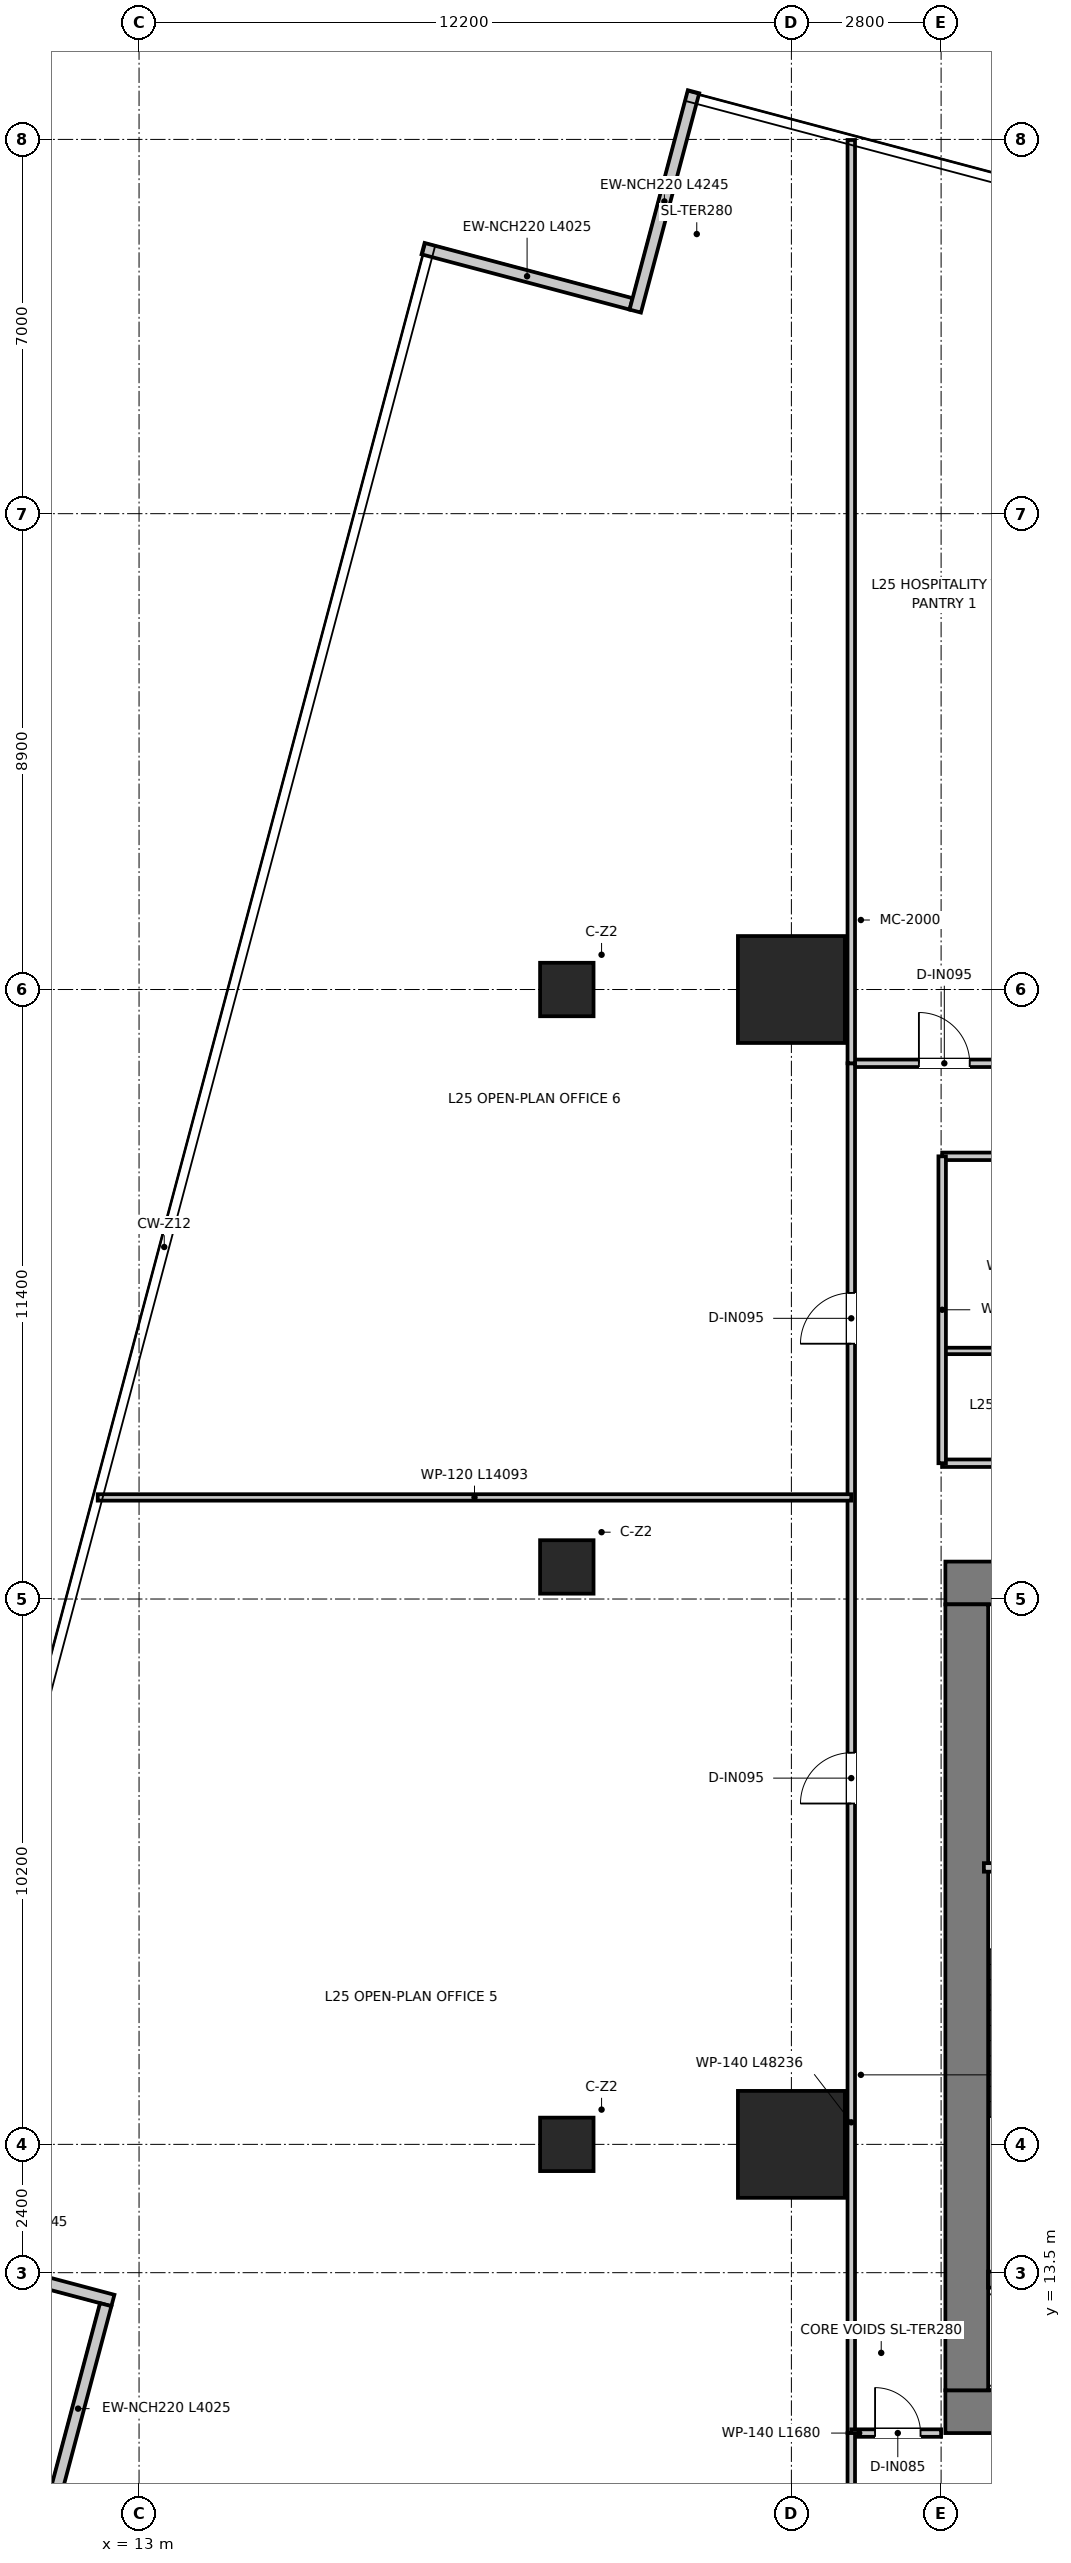
"""IFC4 building model, lengths in metres.
Left out: names, types, materials, properties, quantities, classifications, styles, units other than length and angle.
Written with IfcOpenShell. Run it as: python <this file> out.ifc"""

import sys

from ifc_helpers import new_model, si_unit, direction, frame, frame_2d, origin, origin_2d, place, context, subcontext, project, spatial, rectangle, extrude, source, transform, mapped, element, fill, save


model = new_model("IFC4")
c1 = context("Model", 3, precision=1e-05, world=origin(), true_north=direction((0.0, 1.0)))
c2 = subcontext(c1, "Body", "Model", "MODEL_VIEW")
j1 = project(units=[si_unit("LENGTHUNIT", "METRE"), si_unit("PLANEANGLEUNIT", "RADIAN")], contexts=[c1])
p1 = place(None, origin())
s1 = spatial("IfcSite", under=j1, at=p1, CompositionType="ELEMENT")
p2 = place(p1, origin())
s2 = spatial("IfcBuilding", under=s1, at=p2, CompositionType="ELEMENT")
p3 = place(p2, frame((0.0, 0.0, 105.85)))
s3 = spatial("IfcBuildingStorey", under=s2, at=p3, CompositionType="ELEMENT", Elevation=105.85)
p4 = place(p3, frame((28.08, 10.9, 0.0), z_axis=(0.0, 0.0, 1.0), x_axis=(1.0, 0.0, 0.0)))
e1 = element("IfcWall", 1, at=p4, inside=s3, PredefinedType="SHEAR", context=c2, shape_type="SweptSolid", body=[
    extrude(rectangle(XDim=15.84, YDim=0.8, at=frame_2d((7.92, 0.0))), origin(), (0.0, 0.0, 1.0), 3.95),
])
p5 = place(p3, frame((28.08, 26.4, 0.0), z_axis=(0.0, 0.0, 1.0), x_axis=(1.0, 0.0, 0.0)))
e2 = element("IfcWall", 2, at=p5, inside=s3, PredefinedType="SHEAR", context=c2, shape_type="SweptSolid", body=[
    extrude(rectangle(XDim=15.84, YDim=0.8, at=frame_2d((7.92, 0.0))), origin(), (0.0, 0.0, 1.0), 3.95),
])
p6 = place(p5, frame((7.22, 0.0, 0.0)))
e3 = element("IfcOpeningElement", 3, at=p6, cuts=e2, PredefinedType="OPENING", context=c2, shape_type="SweptSolid", body=[
    extrude(rectangle(XDim=1.4, YDim=2.2, at=frame_2d((0.7, 1.1))), frame((0.0, 0.41, 0.0), z_axis=(0.0, -1.0, 0.0), x_axis=(1.0, 0.0, 0.0)), (0.0, 0.0, 1.0), 0.82),
])
p7 = place(p5, frame((1.775, 0.0, 0.0)))
e4 = element("IfcOpeningElement", 4, at=p7, cuts=e2, PredefinedType="OPENING", context=c2, shape_type="SweptSolid", body=[
    extrude(rectangle(XDim=1.05, YDim=2.1, at=frame_2d((0.525, 1.05))), frame((0.0, 0.41, 0.0), z_axis=(0.0, -1.0, 0.0), x_axis=(1.0, 0.0, 0.0)), (0.0, 0.0, 1.0), 0.82),
])
p8 = place(p5, frame((13.015, 0.0, 0.0)))
e5 = element("IfcOpeningElement", 5, at=p8, cuts=e2, PredefinedType="OPENING", context=c2, shape_type="SweptSolid", body=[
    extrude(rectangle(XDim=1.05, YDim=2.1, at=frame_2d((0.525, 1.05))), frame((0.0, 0.41, 0.0), z_axis=(0.0, -1.0, 0.0), x_axis=(1.0, 0.0, 0.0)), (0.0, 0.0, 1.0), 0.82),
])
p9 = place(p3, frame((28.48, 11.3, 0.0), z_axis=(0.0, 0.0, 1.0), x_axis=(0.0, 1.0, 0.0)))
e6 = element("IfcWall", 6, at=p9, inside=s3, PredefinedType="SHEAR", context=c2, shape_type="SweptSolid", body=[
    extrude(rectangle(XDim=14.7, YDim=0.8, at=frame_2d((7.35, 0.0))), origin(), (0.0, 0.0, 1.0), 3.95),
])
p10 = place(p3, frame((28.88, 13.37, 0.0), z_axis=(0.0, 0.0, 1.0), x_axis=(1.0, 0.0, 0.0)))
e7 = element("IfcWall", 7, at=p10, inside=s3, PredefinedType="SHEAR", context=c2, shape_type="SweptSolid", body=[
    extrude(rectangle(XDim=3.1, YDim=0.3, at=frame_2d((1.55, 0.0))), origin(), (0.0, 0.0, 1.0), 3.95),
])
m1 = source(origin(), c2, "Body", "SweptSolid", [
    extrude(rectangle(XDim=2.0, YDim=2.0, at=origin_2d()), origin(), (0.0, 0.0, 1.0), 3.95),
])
for number, where, z_axis, x_axis in (
    (8, (25.2, 15.9, 0.0), (0.0, 0.0, 1.0), (1.0, 0.0, 0.0)),
    (9, (25.2, 37.5, 0.0), (0.0, 0.0, 1.0), (1.0, 0.0, 0.0)),
):
    element("IfcColumn", number, at=place(p3, frame(where, z_axis=z_axis, x_axis=x_axis)), inside=s3, PredefinedType="USERDEFINED", context=c2, shape_type="MappedRepresentation", body=[
        mapped(m1, transform((0.0, 0.0, 0.0), x_axis=(1.0, 0.0, 0.0), y_axis=(0.0, 1.0, 0.0), z_axis=(0.0, 0.0, 1.0), scale=1.0)),
    ])
m2 = source(origin(), c2, "Body", "SweptSolid", [
    extrude(rectangle(XDim=1.0, YDim=1.0, at=origin_2d()), origin(), (0.0, 0.0, 1.0), 3.95),
])
for number, where, z_axis, x_axis in (
    (10, (21.0, 15.9, 0.0), (0.0, 0.0, 1.0), (1.0, 0.0, 0.0)),
    (11, (21.0, 26.7, 0.0), (0.0, 0.0, 1.0), (1.0, 0.0, 0.0)),
    (12, (21.0, 37.5, 0.0), (0.0, 0.0, 1.0), (1.0, 0.0, 0.0)),
):
    element("IfcColumn", number, at=place(p3, frame(where, z_axis=z_axis, x_axis=x_axis)), inside=s3, PredefinedType="COLUMN", context=c2, shape_type="MappedRepresentation", body=[
        mapped(m2, transform((0.0, 0.0, 0.0), x_axis=(1.0, 0.0, 0.0), y_axis=(0.0, 1.0, 0.0), z_axis=(0.0, 0.0, 1.0), scale=1.0)),
    ])
p11 = place(p3, frame((22.202, 50.324, 0.0), z_axis=(0.0, 0.0, 1.0), x_axis=(-0.966492181189, 0.256696053144, 0.0)))
e13 = element("IfcWall", 13, at=p11, inside=s3, PredefinedType="ELEMENTEDWALL", context=c2, shape_type="SweptSolid", body=[
    extrude(rectangle(XDim=4.025, YDim=0.22, at=frame_2d((2.012, 0.0))), origin(), (0.0, 0.0, 1.0), 3.67),
])
p12 = place(p3, frame((8.408, 14.07, 0.0), z_axis=(0.0, 0.0, 1.0), x_axis=(0.966496943173, -0.256678123022, 0.0)))
e14 = element("IfcWall", 14, at=p12, inside=s3, PredefinedType="ELEMENTEDWALL", context=c2, shape_type="SweptSolid", body=[
    extrude(rectangle(XDim=4.245, YDim=0.22, at=frame_2d((2.123, 0.0))), origin(), (0.0, 0.0, 1.0), 3.67),
])
p13 = place(p3, frame((12.376, 12.902, 0.0), z_axis=(0.0, 0.0, 1.0), x_axis=(-0.256696053144, -0.966492181189, 0.0)))
e15 = element("IfcWall", 15, at=p13, inside=s3, PredefinedType="ELEMENTEDWALL", context=c2, shape_type="SweptSolid", body=[
    extrude(rectangle(XDim=4.025, YDim=0.22, at=frame_2d((2.012, 0.0))), origin(), (0.0, 0.0, 1.0), 3.67),
])
p14 = place(p3, frame((23.37, 54.292, 0.0), z_axis=(0.0, 0.0, 1.0), x_axis=(-0.256678123022, -0.966496943173, 0.0)))
e16 = element("IfcWall", 16, at=p14, inside=s3, PredefinedType="ELEMENTEDWALL", context=c2, shape_type="SweptSolid", body=[
    extrude(rectangle(XDim=4.245, YDim=0.22, at=frame_2d((2.123, 0.0))), origin(), (0.0, 0.0, 1.0), 3.67),
])
p15 = place(p3, frame((28.8, 21.08, 0.0), z_axis=(0.0, 0.0, 1.0), x_axis=(1.0, 0.0, 0.0)))
e17 = element("IfcWall", 17, at=p15, inside=s3, PredefinedType="PARTITIONING", context=c2, shape_type="SweptSolid", body=[
    extrude(rectangle(XDim=3.16, YDim=0.16, at=frame_2d((1.58, 0.0))), origin(), (0.0, 0.0, 1.0), 3.67),
])
p16 = place(p15, frame((1.055, 0.0, 0.0)))
e18 = element("IfcOpeningElement", 18, at=p16, cuts=e17, PredefinedType="OPENING", context=c2, shape_type="SweptSolid", body=[
    extrude(rectangle(XDim=1.05, YDim=2.1, at=frame_2d((0.525, 1.05))), frame((0.0, 0.09, 0.0), z_axis=(0.0, -1.0, 0.0), x_axis=(1.0, 0.0, 0.0)), (0.0, 0.0, 1.0), 0.18),
])
p17 = place(p3, frame((28.02, 28.64, 0.0), z_axis=(0.0, 0.0, 1.0), x_axis=(1.0, 0.0, 0.0)))
e19 = element("IfcWall", 19, at=p17, inside=s3, PredefinedType="PARTITIONING", context=c2, shape_type="SweptSolid", body=[
    extrude(rectangle(XDim=15.96, YDim=0.14, at=frame_2d((7.98, 0.0))), origin(), (0.0, 0.0, 1.0), 3.08),
])
p18 = place(p17, frame((7.455, 0.0, 0.0)))
e20 = element("IfcOpeningElement", 20, at=p18, cuts=e19, PredefinedType="OPENING", context=c2, shape_type="SweptSolid", body=[
    extrude(rectangle(XDim=1.05, YDim=2.15, at=frame_2d((0.525, 1.075))), frame((0.0, 0.08, 0.0), z_axis=(0.0, -1.0, 0.0), x_axis=(1.0, 0.0, 0.0)), (0.0, 0.0, 1.0), 0.16),
])
p19 = place(p3, frame((28.02, 30.74, 0.0), z_axis=(0.0, 0.0, 1.0), x_axis=(1.0, 0.0, 0.0)))
e21 = element("IfcWall", 21, at=p19, inside=s3, PredefinedType="PARTITIONING", context=c2, shape_type="SweptSolid", body=[
    extrude(rectangle(XDim=15.96, YDim=0.12, at=frame_2d((7.98, 0.0))), origin(), (0.0, 0.0, 1.0), 3.08),
])
p20 = place(p3, frame((28.02, 34.38, 0.0), z_axis=(0.0, 0.0, 1.0), x_axis=(1.0, 0.0, 0.0)))
e22 = element("IfcWall", 22, at=p20, inside=s3, PredefinedType="PARTITIONING", context=c2, shape_type="SweptSolid", body=[
    extrude(rectangle(XDim=15.96, YDim=0.14, at=frame_2d((7.98, 0.0))), origin(), (0.0, 0.0, 1.0), 3.08),
])
p21 = place(p20, frame((1.13, 0.0, 0.0)))
e23 = element("IfcOpeningElement", 23, at=p21, cuts=e22, PredefinedType="OPENING", context=c2, shape_type="SweptSolid", body=[
    extrude(rectangle(XDim=0.9, YDim=2.1, at=frame_2d((0.45, 1.05))), frame((0.0, 0.08, 0.0), z_axis=(0.0, -1.0, 0.0), x_axis=(1.0, 0.0, 0.0)), (0.0, 0.0, 1.0), 0.16),
])
p22 = place(p20, frame((4.33, 0.0, 0.0)))
e24 = element("IfcOpeningElement", 24, at=p22, cuts=e22, PredefinedType="OPENING", context=c2, shape_type="SweptSolid", body=[
    extrude(rectangle(XDim=0.9, YDim=2.1, at=frame_2d((0.45, 1.05))), frame((0.0, 0.08, 0.0), z_axis=(0.0, -1.0, 0.0), x_axis=(1.0, 0.0, 0.0)), (0.0, 0.0, 1.0), 0.16),
])
p23 = place(p20, frame((7.355, 0.0, 0.0)))
e25 = element("IfcOpeningElement", 25, at=p23, cuts=e22, PredefinedType="OPENING", context=c2, shape_type="SweptSolid", body=[
    extrude(rectangle(XDim=0.95, YDim=2.1, at=frame_2d((0.475, 1.05))), frame((0.0, 0.08, 0.0), z_axis=(0.0, -1.0, 0.0), x_axis=(1.0, 0.0, 0.0)), (0.0, 0.0, 1.0), 0.16),
])
p24 = place(p20, frame((12.23, 0.0, 0.0)))
e26 = element("IfcOpeningElement", 26, at=p24, cuts=e22, PredefinedType="OPENING", context=c2, shape_type="SweptSolid", body=[
    extrude(rectangle(XDim=0.95, YDim=2.1, at=frame_2d((0.475, 1.05))), frame((0.0, 0.08, 0.0), z_axis=(0.0, -1.0, 0.0), x_axis=(1.0, 0.0, 0.0)), (0.0, 0.0, 1.0), 0.16),
])
p25 = place(p3, frame((28.02, 28.64, 0.0), z_axis=(0.0, 0.0, 1.0), x_axis=(0.0, 1.0, 0.0)))
e27 = element("IfcWall", 27, at=p25, inside=s3, PredefinedType="PARTITIONING", context=c2, shape_type="SweptSolid", body=[
    extrude(rectangle(XDim=5.74, YDim=0.14, at=frame_2d((2.87, 0.0))), origin(), (0.0, 0.0, 1.0), 3.27),
])
p26 = place(p3, frame((26.32, 36.12, 0.0), z_axis=(0.0, 0.0, 1.0), x_axis=(1.0, 0.0, 0.0)))
e28 = element("IfcWall", 28, at=p26, inside=s3, PredefinedType="PARTITIONING", context=c2, shape_type="SweptSolid", body=[
    extrude(rectangle(XDim=19.36, YDim=0.14, at=frame_2d((9.68, 0.0))), origin(), (0.0, 0.0, 1.0), 3.08),
])
p27 = place(p26, frame((1.265, 0.0, 0.0)))
e29 = element("IfcOpeningElement", 29, at=p27, cuts=e28, PredefinedType="OPENING", context=c2, shape_type="SweptSolid", body=[
    extrude(rectangle(XDim=0.95, YDim=2.1, at=frame_2d((0.475, 1.05))), frame((0.0, 0.08, 0.0), z_axis=(0.0, -1.0, 0.0), x_axis=(1.0, 0.0, 0.0)), (0.0, 0.0, 1.0), 0.16),
])
p28 = place(p26, frame((5.855, 0.0, 0.0)))
e30 = element("IfcOpeningElement", 30, at=p28, cuts=e28, PredefinedType="OPENING", context=c2, shape_type="SweptSolid", body=[
    extrude(rectangle(XDim=0.95, YDim=2.1, at=frame_2d((0.475, 1.05))), frame((0.0, 0.08, 0.0), z_axis=(0.0, -1.0, 0.0), x_axis=(1.0, 0.0, 0.0)), (0.0, 0.0, 1.0), 0.16),
])
p29 = place(p26, frame((11.555, 0.0, 0.0)))
e31 = element("IfcOpeningElement", 31, at=p29, cuts=e28, PredefinedType="OPENING", context=c2, shape_type="SweptSolid", body=[
    extrude(rectangle(XDim=0.95, YDim=2.1, at=frame_2d((0.475, 1.05))), frame((0.0, 0.08, 0.0), z_axis=(0.0, -1.0, 0.0), x_axis=(1.0, 0.0, 0.0)), (0.0, 0.0, 1.0), 0.16),
])
p30 = place(p26, frame((16.645, 0.0, 0.0)))
e32 = element("IfcOpeningElement", 32, at=p30, cuts=e28, PredefinedType="OPENING", context=c2, shape_type="SweptSolid", body=[
    extrude(rectangle(XDim=0.95, YDim=2.1, at=frame_2d((0.475, 1.05))), frame((0.0, 0.08, 0.0), z_axis=(0.0, -1.0, 0.0), x_axis=(1.0, 0.0, 0.0)), (0.0, 0.0, 1.0), 0.16),
])
p31 = place(p3, frame((26.32, 10.5, 0.0), z_axis=(0.0, 0.0, 1.0), x_axis=(0.0, 1.0, 0.0)))
e33 = element("IfcWall", 33, at=p31, inside=s3, PredefinedType="PARTITIONING", context=c2, shape_type="SweptSolid", body=[
    extrude(rectangle(XDim=25.62, YDim=0.14, at=frame_2d((12.81, 0.0))), origin(), (0.0, 0.0, 1.0), 2.97),
])
p32 = place(p31, frame((11.775, 0.0, 0.0)))
e34 = element("IfcOpeningElement", 34, at=p32, cuts=e33, PredefinedType="OPENING", context=c2, shape_type="SweptSolid", body=[
    extrude(rectangle(XDim=0.95, YDim=2.1, at=frame_2d((0.475, 1.05))), frame((0.0, 0.08, 0.0), z_axis=(0.0, -1.0, 0.0), x_axis=(1.0, 0.0, 0.0)), (0.0, 0.0, 1.0), 0.16),
])
p33 = place(p31, frame((20.375, 0.0, 0.0)))
e35 = element("IfcOpeningElement", 35, at=p33, cuts=e33, PredefinedType="OPENING", context=c2, shape_type="SweptSolid", body=[
    extrude(rectangle(XDim=0.95, YDim=2.1, at=frame_2d((0.475, 1.05))), frame((0.0, 0.08, 0.0), z_axis=(0.0, -1.0, 0.0), x_axis=(1.0, 0.0, 0.0)), (0.0, 0.0, 1.0), 0.16),
])
p34 = place(p3, frame((26.32, 10.5, 0.0), z_axis=(0.0, 0.0, 1.0), x_axis=(1.0, 0.0, 0.0)))
e36 = element("IfcWall", 36, at=p34, inside=s3, PredefinedType="PARTITIONING", context=c2, shape_type="SweptSolid", body=[
    extrude(rectangle(XDim=1.68, YDim=0.14, at=frame_2d((0.84, 0.0))), origin(), (0.0, 0.0, 1.0), 3.67),
])
p35 = place(p34, frame((0.445, 0.0, 0.0)))
e37 = element("IfcOpeningElement", 37, at=p35, cuts=e36, PredefinedType="OPENING", context=c2, shape_type="SweptSolid", body=[
    extrude(rectangle(XDim=0.85, YDim=2.1, at=frame_2d((0.425, 1.05))), frame((0.0, 0.08, 0.0), z_axis=(0.0, -1.0, 0.0), x_axis=(1.0, 0.0, 0.0)), (0.0, 0.0, 1.0), 0.16),
])
p36 = place(p3, frame((26.32, 36.12, 0.0), z_axis=(0.0, 0.0, 1.0), x_axis=(0.0, 1.0, 0.0)))
e38 = element("IfcWall", 38, at=p36, inside=s3, PredefinedType="PARTITIONING", context=c2, shape_type="SweptSolid", body=[
    extrude(rectangle(XDim=17.269, YDim=0.14, at=frame_2d((8.635, 0.0))), origin(), (0.0, 0.0, 1.0), 2.97),
])
p37 = place(p3, frame((26.32, 5.153, 0.0), z_axis=(0.0, 0.0, 1.0), x_axis=(0.0, 1.0, 0.0)))
e39 = element("IfcWall", 39, at=p37, inside=s3, PredefinedType="PARTITIONING", context=c2, shape_type="SweptSolid", body=[
    extrude(rectangle(XDim=5.347, YDim=0.14, at=frame_2d((2.674, 0.0))), origin(), (0.0, 0.0, 1.0), 3.67),
])
p38 = place(p3, frame((12.227, 28.0, 0.0), z_axis=(0.0, 0.0, 1.0), x_axis=(1.0, 0.0, 0.0)))
e40 = element("IfcWall", 40, at=p38, inside=s3, PredefinedType="PARTITIONING", context=c2, shape_type="SweptSolid", body=[
    extrude(rectangle(XDim=14.093, YDim=0.12, at=frame_2d((7.046, 0.0))), origin(), (0.0, 0.0, 1.0), 2.97),
])
p39 = place(p27, origin())
e41 = element("IfcDoor", 41, at=p39, inside=s3, OperationType="SINGLE_SWING_LEFT", PredefinedType="DOOR", context=c2, shape_type="SweptSolid", body=[
    extrude(rectangle(XDim=0.95, YDim=2.1, at=frame_2d((0.475, 1.05))), frame((0.0, 0.025, 0.0), z_axis=(0.0, -1.0, 0.0), x_axis=(1.0, 0.0, 0.0)), (0.0, 0.0, 1.0), 0.05),
])
fill(e29, e41)
p40 = place(p32, origin())
e42 = element("IfcDoor", 42, at=p40, inside=s3, OperationType="SINGLE_SWING_LEFT", PredefinedType="DOOR", context=c2, shape_type="SweptSolid", body=[
    extrude(rectangle(XDim=0.95, YDim=2.1, at=frame_2d((0.475, 1.05))), frame((0.0, 0.025, 0.0), z_axis=(0.0, -1.0, 0.0), x_axis=(1.0, 0.0, 0.0)), (0.0, 0.0, 1.0), 0.05),
])
fill(e34, e42)
p41 = place(p33, origin())
e43 = element("IfcDoor", 43, at=p41, inside=s3, OperationType="SINGLE_SWING_LEFT", PredefinedType="DOOR", context=c2, shape_type="SweptSolid", body=[
    extrude(rectangle(XDim=0.95, YDim=2.1, at=frame_2d((0.475, 1.05))), frame((0.0, 0.025, 0.0), z_axis=(0.0, -1.0, 0.0), x_axis=(1.0, 0.0, 0.0)), (0.0, 0.0, 1.0), 0.05),
])
fill(e35, e43)
p42 = place(p35, origin())
e44 = element("IfcDoor", 44, at=p42, inside=s3, OperationType="SINGLE_SWING_LEFT", PredefinedType="DOOR", context=c2, shape_type="SweptSolid", body=[
    extrude(rectangle(XDim=0.85, YDim=2.1, at=frame_2d((0.425, 1.05))), frame((0.0, 0.025, 0.0), z_axis=(0.0, -1.0, 0.0), x_axis=(1.0, 0.0, 0.0)), (0.0, 0.0, 1.0), 0.05),
])
fill(e37, e44)
save(model, sys.argv[1])
